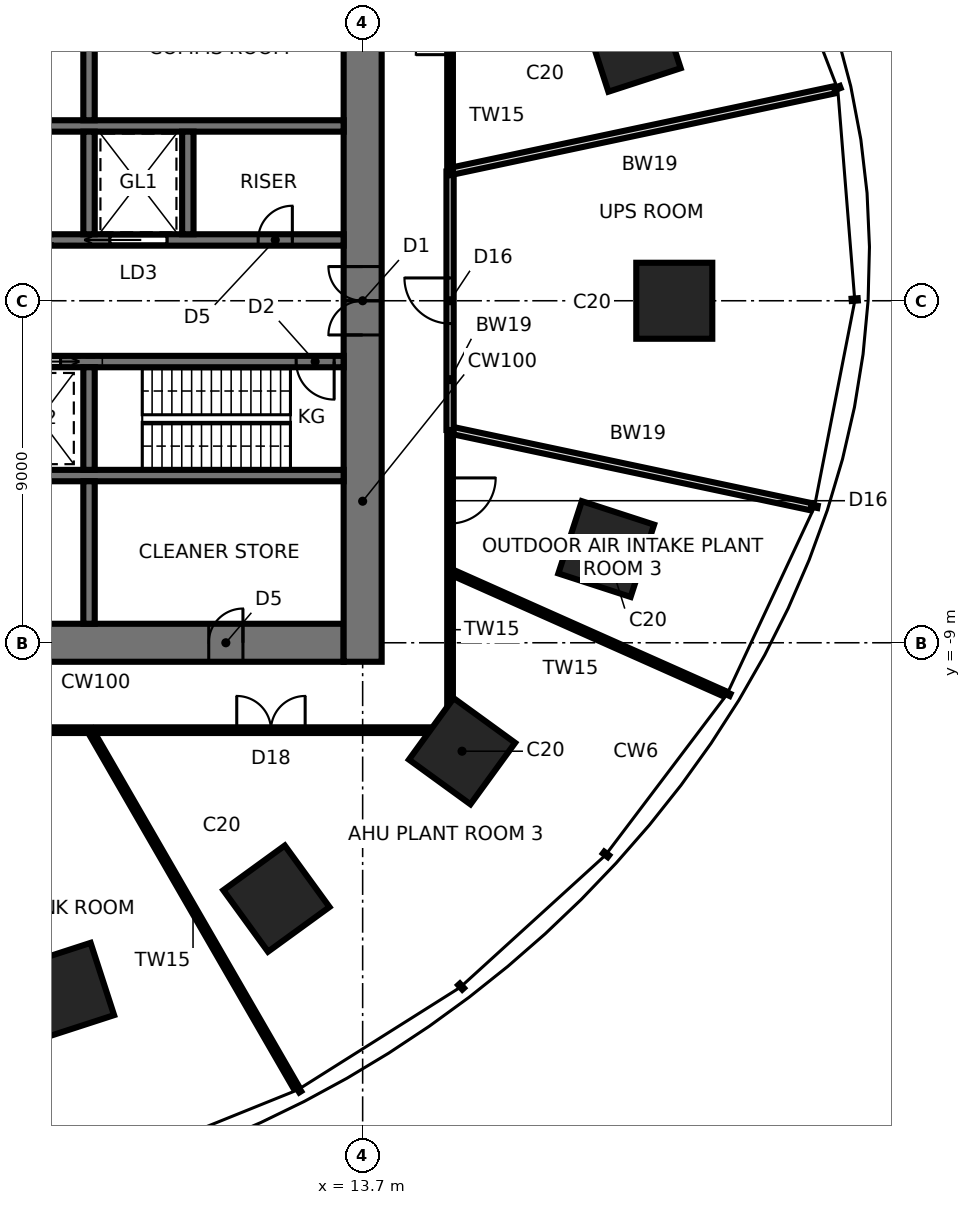
"""IFC4 building model, lengths in metres.
Left out: names, types, materials, properties, quantities, classifications, styles, units other than length and angle.
Written with IfcOpenShell. Run it as: python <this file> out.ifc"""

import sys

from ifc_helpers import new_model, si_unit, direction, frame, frame_2d, origin, origin_2d, place, context, subcontext, project, spatial, rectangle, extrude, element, fill, save


model = new_model("IFC4")
c1 = context("Model", 3, precision=1e-05, world=origin(), true_north=direction((0.0, 1.0)))
c2 = subcontext(c1, "Body", "Model", "MODEL_VIEW")
j1 = project(units=[si_unit("LENGTHUNIT", "METRE"), si_unit("PLANEANGLEUNIT", "RADIAN")], contexts=[c1])
p1 = place(None, origin())
s1 = spatial("IfcSite", under=j1, at=p1, CompositionType="ELEMENT")
p2 = place(p1, origin())
s2 = spatial("IfcBuilding", under=s1, at=p2, CompositionType="ELEMENT")
p3 = place(p2, frame((0.0, 0.0, 86.8)))
s3 = spatial("IfcBuildingStorey", under=s2, at=p3, CompositionType="ELEMENT", Elevation=86.8)
for number, where, z_axis, x_axis in (
    (1, (21.9, 0.0, 0.0), (0.0, 0.0, 1.0), (1.0, 0.0, 0.0)),
    (2, (20.808, 6.761, 0.0), (0.0, 0.0, 1.0), (0.951, 0.309, 0.0)),
    (3, (5.9, -18.157, 0.0), (0.0, 0.0, 1.0), (0.309, -0.951, 0.0)),
    (4, (11.43, -15.733, 0.0), (0.0, 0.0, 1.0), (0.588, -0.809, 0.0)),
    (5, (16.315, -11.854, 0.0), (0.0, 0.0, 1.0), (0.809, -0.588, 0.0)),
    (6, (20.109, -6.534, 0.0), (0.0, 0.0, 1.0), (0.951, -0.309, 0.0)),
):
    element("IfcColumn", number, at=place(p3, frame(where, z_axis=z_axis, x_axis=x_axis)), inside=s3, PredefinedType="COLUMN", context=c2, shape_type="SweptSolid", body=[
        extrude(rectangle(XDim=2.0, YDim=2.0, at=origin_2d()), origin(), (0.0, 0.0, 1.0), 5.6),
    ])
p4 = place(p3, frame((-13.2, -9.0, 0.0), z_axis=(0.0, 0.0, 1.0), x_axis=(1.0, 0.0, 0.0)))
e7 = element("IfcWall", 7, at=p4, inside=s3, PredefinedType="SHEAR", context=c2, shape_type="SweptSolid", body=[
    extrude(rectangle(XDim=26.4, YDim=1.0, at=frame_2d((13.2, 0.0))), origin(), (0.0, 0.0, 1.0), 5.6),
])
p5 = place(p4, frame((2.65, 0.0, 0.0)))
e8 = element("IfcOpeningElement", 8, at=p5, cuts=e7, PredefinedType="OPENING", context=c2, shape_type="SweptSolid", body=[
    extrude(rectangle(XDim=0.9, YDim=2.1, at=frame_2d((0.45, 1.05))), frame((0.0, 0.51, 0.0), z_axis=(0.0, -1.0, 0.0), x_axis=(1.0, 0.0, 0.0)), (0.0, 0.0, 1.0), 1.02),
])
p6 = place(p4, frame((9.5, 0.0, 0.0)))
e9 = element("IfcOpeningElement", 9, at=p6, cuts=e7, PredefinedType="OPENING", context=c2, shape_type="SweptSolid", body=[
    extrude(rectangle(XDim=0.9, YDim=2.1, at=frame_2d((0.45, 1.05))), frame((0.0, 0.51, 0.0), z_axis=(0.0, -1.0, 0.0), x_axis=(1.0, 0.0, 0.0)), (0.0, 0.0, 1.0), 1.02),
])
p7 = place(p4, frame((16.0, 0.0, 0.0)))
e10 = element("IfcOpeningElement", 10, at=p7, cuts=e7, PredefinedType="OPENING", context=c2, shape_type="SweptSolid", body=[
    extrude(rectangle(XDim=0.9, YDim=2.1, at=frame_2d((0.45, 1.05))), frame((0.0, 0.51, 0.0), z_axis=(0.0, -1.0, 0.0), x_axis=(1.0, 0.0, 0.0)), (0.0, 0.0, 1.0), 1.02),
])
p8 = place(p4, frame((22.85, 0.0, 0.0)))
e11 = element("IfcOpeningElement", 11, at=p8, cuts=e7, PredefinedType="OPENING", context=c2, shape_type="SweptSolid", body=[
    extrude(rectangle(XDim=0.9, YDim=2.1, at=frame_2d((0.45, 1.05))), frame((0.0, 0.51, 0.0), z_axis=(0.0, -1.0, 0.0), x_axis=(1.0, 0.0, 0.0)), (0.0, 0.0, 1.0), 1.02),
])
p9 = place(p3, frame((13.7, -9.5, 0.0), z_axis=(0.0, 0.0, 1.0), x_axis=(0.0, 1.0, 0.0)))
e12 = element("IfcWall", 12, at=p9, inside=s3, PredefinedType="SHEAR", context=c2, shape_type="SweptSolid", body=[
    extrude(rectangle(XDim=19.0, YDim=1.0, at=frame_2d((9.5, 0.0))), origin(), (0.0, 0.0, 1.0), 5.6),
])
p10 = place(p9, frame((8.6, 0.0, 0.0)))
e13 = element("IfcOpeningElement", 13, at=p10, cuts=e12, PredefinedType="OPENING", context=c2, shape_type="SweptSolid", body=[
    extrude(rectangle(XDim=1.8, YDim=2.4, at=frame_2d((0.9, 1.2))), frame((0.0, 0.51, 0.0), z_axis=(0.0, -1.0, 0.0), x_axis=(1.0, 0.0, 0.0)), (0.0, 0.0, 1.0), 1.02),
])
p11 = place(p3, frame((-13.2, 1.6, 0.0), z_axis=(0.0, 0.0, 1.0), x_axis=(1.0, 0.0, 0.0)))
e14 = element("IfcWall", 14, at=p11, inside=s3, PredefinedType="SHEAR", context=c2, shape_type="SweptSolid", body=[
    extrude(rectangle(XDim=26.4, YDim=0.3, at=frame_2d((13.2, 0.0))), origin(), (0.0, 0.0, 1.0), 5.6),
])
p12 = place(p11, frame((0.25, 0.0, 0.0)))
e15 = element("IfcOpeningElement", 15, at=p12, cuts=e14, PredefinedType="OPENING", context=c2, shape_type="SweptSolid", body=[
    extrude(rectangle(XDim=1.0, YDim=2.1, at=frame_2d((0.5, 1.05))), frame((0.0, 0.16, 0.0), z_axis=(0.0, -1.0, 0.0), x_axis=(1.0, 0.0, 0.0)), (0.0, 0.0, 1.0), 0.32),
])
p13 = place(p11, frame((20.25, 0.0, 0.0)))
e16 = element("IfcOpeningElement", 16, at=p13, cuts=e14, PredefinedType="OPENING", context=c2, shape_type="SweptSolid", body=[
    extrude(rectangle(XDim=1.5, YDim=2.4, at=frame_2d((0.75, 1.2))), frame((0.0, 0.16, 0.0), z_axis=(0.0, -1.0, 0.0), x_axis=(1.0, 0.0, 0.0)), (0.0, 0.0, 1.0), 0.32),
])
p14 = place(p11, frame((7.55, 0.0, 0.0)))
e17 = element("IfcOpeningElement", 17, at=p14, cuts=e14, PredefinedType="OPENING", context=c2, shape_type="SweptSolid", body=[
    extrude(rectangle(XDim=0.9, YDim=2.1, at=frame_2d((0.45, 1.05))), frame((0.0, 0.16, 0.0), z_axis=(0.0, -1.0, 0.0), x_axis=(1.0, 0.0, 0.0)), (0.0, 0.0, 1.0), 0.32),
])
p15 = place(p11, frame((10.15, 0.0, 0.0)))
e18 = element("IfcOpeningElement", 18, at=p15, cuts=e14, PredefinedType="OPENING", context=c2, shape_type="SweptSolid", body=[
    extrude(rectangle(XDim=0.9, YDim=2.1, at=frame_2d((0.45, 1.05))), frame((0.0, 0.16, 0.0), z_axis=(0.0, -1.0, 0.0), x_axis=(1.0, 0.0, 0.0)), (0.0, 0.0, 1.0), 0.32),
])
p16 = place(p11, frame((12.75, 0.0, 0.0)))
e19 = element("IfcOpeningElement", 19, at=p16, cuts=e14, PredefinedType="OPENING", context=c2, shape_type="SweptSolid", body=[
    extrude(rectangle(XDim=0.9, YDim=2.1, at=frame_2d((0.45, 1.05))), frame((0.0, 0.16, 0.0), z_axis=(0.0, -1.0, 0.0), x_axis=(1.0, 0.0, 0.0)), (0.0, 0.0, 1.0), 0.32),
])
p17 = place(p11, frame((24.15, 0.0, 0.0)))
e20 = element("IfcOpeningElement", 20, at=p17, cuts=e14, PredefinedType="OPENING", context=c2, shape_type="SweptSolid", body=[
    extrude(rectangle(XDim=0.9, YDim=2.1, at=frame_2d((0.45, 1.05))), frame((0.0, 0.16, 0.0), z_axis=(0.0, -1.0, 0.0), x_axis=(1.0, 0.0, 0.0)), (0.0, 0.0, 1.0), 0.32),
])
p18 = place(p3, frame((-13.2, -1.6, 0.0), z_axis=(0.0, 0.0, 1.0), x_axis=(1.0, 0.0, 0.0)))
e21 = element("IfcWall", 21, at=p18, inside=s3, PredefinedType="SHEAR", context=c2, shape_type="SweptSolid", body=[
    extrude(rectangle(XDim=26.4, YDim=0.3, at=frame_2d((13.2, 0.0))), origin(), (0.0, 0.0, 1.0), 5.6),
])
p19 = place(p18, frame((25.15, 0.0, 0.0)))
e22 = element("IfcOpeningElement", 22, at=p19, cuts=e21, PredefinedType="OPENING", context=c2, shape_type="SweptSolid", body=[
    extrude(rectangle(XDim=1.0, YDim=2.1, at=frame_2d((0.5, 1.05))), frame((0.0, 0.16, 0.0), z_axis=(0.0, -1.0, 0.0), x_axis=(1.0, 0.0, 0.0)), (0.0, 0.0, 1.0), 0.32),
])
p20 = place(p18, frame((15.25, 0.0, 0.0)))
e23 = element("IfcOpeningElement", 23, at=p20, cuts=e21, PredefinedType="OPENING", context=c2, shape_type="SweptSolid", body=[
    extrude(rectangle(XDim=1.1, YDim=2.3, at=frame_2d((0.55, 1.15))), frame((0.0, 0.16, 0.0), z_axis=(0.0, -1.0, 0.0), x_axis=(1.0, 0.0, 0.0)), (0.0, 0.0, 1.0), 0.32),
])
p21 = place(p18, frame((17.85, 0.0, 0.0)))
e24 = element("IfcOpeningElement", 24, at=p21, cuts=e21, PredefinedType="OPENING", context=c2, shape_type="SweptSolid", body=[
    extrude(rectangle(XDim=1.1, YDim=2.3, at=frame_2d((0.55, 1.15))), frame((0.0, 0.16, 0.0), z_axis=(0.0, -1.0, 0.0), x_axis=(1.0, 0.0, 0.0)), (0.0, 0.0, 1.0), 0.32),
])
p22 = place(p18, frame((5.55, 0.0, 0.0)))
e25 = element("IfcOpeningElement", 25, at=p22, cuts=e21, PredefinedType="OPENING", context=c2, shape_type="SweptSolid", body=[
    extrude(rectangle(XDim=0.9, YDim=2.1, at=frame_2d((0.45, 1.05))), frame((0.0, 0.16, 0.0), z_axis=(0.0, -1.0, 0.0), x_axis=(1.0, 0.0, 0.0)), (0.0, 0.0, 1.0), 0.32),
])
for number, where, z_axis, x_axis in (
    (26, (-13.2, 4.6, 0.0), (0.0, 0.0, 1.0), (1.0, 0.0, 0.0)),
    (27, (-13.2, -4.6, 0.0), (0.0, 0.0, 1.0), (1.0, 0.0, 0.0)),
):
    element("IfcWall", number, at=place(p3, frame(where, z_axis=z_axis, x_axis=x_axis)), inside=s3, PredefinedType="SHEAR", context=c2, shape_type="SweptSolid", body=[
        extrude(rectangle(XDim=26.4, YDim=0.3, at=frame_2d((13.2, 0.0))), origin(), (0.0, 0.0, 1.0), 5.6),
    ])
p23 = place(p3, frame((6.5, 1.75, 0.0), z_axis=(0.0, 0.0, 1.0), x_axis=(0.0, 1.0, 0.0)))
e28 = element("IfcWall", 28, at=p23, inside=s3, PredefinedType="SHEAR", context=c2, shape_type="SweptSolid", body=[
    extrude(rectangle(XDim=2.7, YDim=0.3, at=frame_2d((1.35, 0.0))), origin(), (0.0, 0.0, 1.0), 5.6),
])
p24 = place(p3, frame((6.5, 4.75, 0.0), z_axis=(0.0, 0.0, 1.0), x_axis=(0.0, 1.0, 0.0)))
e29 = element("IfcWall", 29, at=p24, inside=s3, PredefinedType="SHEAR", context=c2, shape_type="SweptSolid", body=[
    extrude(rectangle(XDim=3.75, YDim=0.3, at=frame_2d((1.875, 0.0))), origin(), (0.0, 0.0, 1.0), 5.6),
])
p25 = place(p3, frame((6.5, -1.75, 0.0), z_axis=(0.0, 0.0, 1.0), x_axis=(0.0, -1.0, 0.0)))
e30 = element("IfcWall", 30, at=p25, inside=s3, PredefinedType="SHEAR", context=c2, shape_type="SweptSolid", body=[
    extrude(rectangle(XDim=2.7, YDim=0.3, at=frame_2d((1.35, 0.0))), origin(), (0.0, 0.0, 1.0), 5.6),
])
p26 = place(p3, frame((6.5, -4.75, 0.0), z_axis=(0.0, 0.0, 1.0), x_axis=(0.0, -1.0, 0.0)))
e31 = element("IfcWall", 31, at=p26, inside=s3, PredefinedType="SHEAR", context=c2, shape_type="SweptSolid", body=[
    extrude(rectangle(XDim=3.75, YDim=0.3, at=frame_2d((1.875, 0.0))), origin(), (0.0, 0.0, 1.0), 5.6),
])
p27 = place(p3, frame((9.1, 1.75, 0.0), z_axis=(0.0, 0.0, 1.0), x_axis=(0.0, 1.0, 0.0)))
e32 = element("IfcWall", 32, at=p27, inside=s3, PredefinedType="SHEAR", context=c2, shape_type="SweptSolid", body=[
    extrude(rectangle(XDim=2.7, YDim=0.3, at=frame_2d((1.35, 0.0))), origin(), (0.0, 0.0, 1.0), 5.6),
])
p28 = place(p3, frame((-16.0, -11.3, 0.0), z_axis=(0.0, 0.0, 1.0), x_axis=(1.0, 0.0, 0.0)))
e33 = element("IfcWall", 33, at=p28, inside=s3, PredefinedType="PARTITIONING", context=c2, shape_type="SweptSolid", body=[
    extrude(rectangle(XDim=32.0, YDim=0.15, at=frame_2d((16.0, 0.0))), origin(), (0.0, 0.0, 1.0), 5.4),
])
p29 = place(p28, frame((7.026, 0.0, 0.0)))
e34 = element("IfcOpeningElement", 34, at=p29, cuts=e33, PredefinedType="OPENING", context=c2, shape_type="SweptSolid", body=[
    extrude(rectangle(XDim=1.2, YDim=2.1, at=frame_2d((0.6, 1.05))), frame((0.0, 0.085, 0.0), z_axis=(0.0, -1.0, 0.0), x_axis=(1.0, 0.0, 0.0)), (0.0, 0.0, 1.0), 0.17),
])
p30 = place(p28, frame((11.544, 0.0, 0.0)))
e35 = element("IfcOpeningElement", 35, at=p30, cuts=e33, PredefinedType="OPENING", context=c2, shape_type="SweptSolid", body=[
    extrude(rectangle(XDim=1.2, YDim=2.1, at=frame_2d((0.6, 1.05))), frame((0.0, 0.085, 0.0), z_axis=(0.0, -1.0, 0.0), x_axis=(1.0, 0.0, 0.0)), (0.0, 0.0, 1.0), 0.17),
])
p31 = place(p28, frame((17.768, 0.0, 0.0)))
e36 = element("IfcOpeningElement", 36, at=p31, cuts=e33, PredefinedType="OPENING", context=c2, shape_type="SweptSolid", body=[
    extrude(rectangle(XDim=1.8, YDim=2.4, at=frame_2d((0.9, 1.2))), frame((0.0, 0.085, 0.0), z_axis=(0.0, -1.0, 0.0), x_axis=(1.0, 0.0, 0.0)), (0.0, 0.0, 1.0), 0.17),
])
p32 = place(p28, frame((26.387, 0.0, 0.0)))
e37 = element("IfcOpeningElement", 37, at=p32, cuts=e33, PredefinedType="OPENING", context=c2, shape_type="SweptSolid", body=[
    extrude(rectangle(XDim=1.8, YDim=2.4, at=frame_2d((0.9, 1.2))), frame((0.0, 0.085, 0.0), z_axis=(0.0, -1.0, 0.0), x_axis=(1.0, 0.0, 0.0)), (0.0, 0.0, 1.0), 0.17),
])
p33 = place(p3, frame((6.524, -11.3, 0.0), z_axis=(0.0, 0.0, 1.0), x_axis=(0.499989292232, -0.866031585829, 0.0)))
e38 = element("IfcWall", 38, at=p33, inside=s3, PredefinedType="PARTITIONING", context=c2, shape_type="SweptSolid", body=[
    extrude(rectangle(XDim=10.85, YDim=0.15, at=frame_2d((5.425, 0.0))), origin(), (0.0, 0.0, 1.0), 5.4),
])
p34 = place(p3, frame((16.0, -11.3, 0.0), z_axis=(0.0, 0.0, 1.0), x_axis=(0.0, 1.0, 0.0)))
e39 = element("IfcWall", 39, at=p34, inside=s3, PredefinedType="PARTITIONING", context=c2, shape_type="SweptSolid", body=[
    extrude(rectangle(XDim=7.899, YDim=0.15, at=frame_2d((3.95, 0.0))), origin(), (0.0, 0.0, 1.0), 5.4),
])
p35 = place(p34, frame((5.438, 0.0, 0.0)))
e40 = element("IfcOpeningElement", 40, at=p35, cuts=e39, PredefinedType="OPENING", context=c2, shape_type="SweptSolid", body=[
    extrude(rectangle(XDim=1.2, YDim=2.1, at=frame_2d((0.6, 1.05))), frame((0.0, 0.085, 0.0), z_axis=(0.0, -1.0, 0.0), x_axis=(1.0, 0.0, 0.0)), (0.0, 0.0, 1.0), 0.17),
])
p36 = place(p3, frame((16.0, -7.124, 0.0), z_axis=(0.0, 0.0, 1.0), x_axis=(0.91354979121, -0.406726909584, 0.0)))
e41 = element("IfcWall", 41, at=p36, inside=s3, PredefinedType="PARTITIONING", context=c2, shape_type="SweptSolid", body=[
    extrude(rectangle(XDim=7.89, YDim=0.15, at=frame_2d((3.945, 0.0))), origin(), (0.0, 0.0, 1.0), 5.4),
])
p37 = place(p3, frame((16.0, -3.401, 0.0), z_axis=(0.0, 0.0, 1.0), x_axis=(0.978145186273, -0.207923049637, 0.0)))
e42 = element("IfcWall", 42, at=p37, inside=s3, PredefinedType="SOLIDWALL", context=c2, shape_type="SweptSolid", body=[
    extrude(rectangle(XDim=9.719, YDim=0.19, at=frame_2d((4.859, 0.0))), origin(), (0.0, 0.0, 1.0), 5.4),
])
p38 = place(p3, frame((16.0, -3.401, 0.0), z_axis=(0.0, 0.0, 1.0), x_axis=(0.0, 1.0, 0.0)))
e43 = element("IfcWall", 43, at=p38, inside=s3, PredefinedType="SOLIDWALL", context=c2, shape_type="SweptSolid", body=[
    extrude(rectangle(XDim=6.802, YDim=0.19, at=frame_2d((3.401, 0.0))), origin(), (0.0, 0.0, 1.0), 5.4),
])
p39 = place(p38, frame((2.801, 0.0, 0.0)))
e44 = element("IfcOpeningElement", 44, at=p39, cuts=e43, PredefinedType="OPENING", context=c2, shape_type="SweptSolid", body=[
    extrude(rectangle(XDim=1.2, YDim=2.1, at=frame_2d((0.6, 1.05))), frame((0.0, 0.105, 0.0), z_axis=(0.0, -1.0, 0.0), x_axis=(1.0, 0.0, 0.0)), (0.0, 0.0, 1.0), 0.21),
])
p40 = place(p3, frame((26.123, 5.553, 0.0), z_axis=(0.0, 0.0, 1.0), x_axis=(-0.978145959178, -0.207919413582, 0.0)))
e45 = element("IfcWall", 45, at=p40, inside=s3, PredefinedType="SOLIDWALL", context=c2, shape_type="SweptSolid", body=[
    extrude(rectangle(XDim=10.349, YDim=0.19, at=frame_2d((5.175, 0.0))), origin(), (0.0, 0.0, 1.0), 5.4),
])
p41 = place(p3, frame((16.0, 3.401, 0.0), z_axis=(0.0, 0.0, 1.0), x_axis=(0.0, 1.0, 0.0)))
e46 = element("IfcWall", 46, at=p41, inside=s3, PredefinedType="PARTITIONING", context=c2, shape_type="SweptSolid", body=[
    extrude(rectangle(XDim=7.899, YDim=0.15, at=frame_2d((3.95, 0.0))), origin(), (0.0, 0.0, 1.0), 5.4),
])
p42 = place(p41, frame((3.075, 0.0, 0.0)))
e47 = element("IfcOpeningElement", 47, at=p42, cuts=e46, PredefinedType="OPENING", context=c2, shape_type="SweptSolid", body=[
    extrude(rectangle(XDim=1.8, YDim=2.4, at=frame_2d((0.9, 1.2))), frame((0.0, 0.085, 0.0), z_axis=(0.0, -1.0, 0.0), x_axis=(1.0, 0.0, 0.0)), (0.0, 0.0, 1.0), 0.17),
])
p43 = place(p10, origin())
e48 = element("IfcDoor", 48, at=p43, inside=s3, OperationType="DOUBLE_DOOR_SINGLE_SWING", PredefinedType="DOOR", context=c2, shape_type="SweptSolid", body=[
    extrude(rectangle(XDim=1.72, YDim=2.36, at=frame_2d((0.9, 1.18))), frame((0.0, 0.025, 0.0), z_axis=(0.0, -1.0, 0.0), x_axis=(1.0, 0.0, 0.0)), (0.0, 0.0, 1.0), 0.05),
    extrude(rectangle(XDim=0.04, YDim=2.4, at=frame_2d((0.02, 1.2))), frame((0.0, 0.25, 0.0), z_axis=(0.0, -1.0, 0.0), x_axis=(1.0, 0.0, 0.0)), (0.0, 0.0, 1.0), 0.5),
    extrude(rectangle(XDim=0.04, YDim=2.4, at=frame_2d((1.78, 1.2))), frame((0.0, 0.25, 0.0), z_axis=(0.0, -1.0, 0.0), x_axis=(1.0, 0.0, 0.0)), (0.0, 0.0, 1.0), 0.5),
    extrude(rectangle(XDim=1.72, YDim=0.04, at=frame_2d((0.9, 2.38))), frame((0.0, 0.25, 0.0), z_axis=(0.0, -1.0, 0.0), x_axis=(1.0, 0.0, 0.0)), (0.0, 0.0, 1.0), 0.5),
])
fill(e13, e48)
p44 = place(p19, frame((1.0, 0.0, 0.0), z_axis=(0.0, 0.0, 1.0), x_axis=(-1.0, 0.0, 0.0)))
e49 = element("IfcDoor", 49, at=p44, inside=s3, OperationType="SINGLE_SWING_LEFT", PredefinedType="DOOR", context=c2, shape_type="SweptSolid", body=[
    extrude(rectangle(XDim=1.0, YDim=2.1, at=frame_2d((0.5, 1.05))), frame((0.0, 0.025, 0.0), z_axis=(0.0, -1.0, 0.0), x_axis=(1.0, 0.0, 0.0)), (0.0, 0.0, 1.0), 0.05),
])
fill(e22, e49)
p45 = place(p13, origin())
e50 = element("IfcDoor", 50, at=p45, inside=s3, OperationType="SLIDING_TO_LEFT", PredefinedType="DOOR", context=c2, shape_type="SweptSolid", body=[
    extrude(rectangle(XDim=1.5, YDim=2.4, at=frame_2d((0.75, 1.2))), frame((0.0, 0.025, 0.0), z_axis=(0.0, -1.0, 0.0), x_axis=(1.0, 0.0, 0.0)), (0.0, 0.0, 1.0), 0.05),
])
fill(e16, e50)
p46 = place(p21, frame((1.1, 0.0, 0.0), z_axis=(0.0, 0.0, 1.0), x_axis=(-1.0, 0.0, 0.0)))
e51 = element("IfcDoor", 51, at=p46, inside=s3, OperationType="SLIDING_TO_LEFT", PredefinedType="DOOR", context=c2, shape_type="SweptSolid", body=[
    extrude(rectangle(XDim=1.1, YDim=2.3, at=frame_2d((0.55, 1.15))), frame((0.0, 0.025, 0.0), z_axis=(0.0, -1.0, 0.0), x_axis=(1.0, 0.0, 0.0)), (0.0, 0.0, 1.0), 0.05),
])
fill(e24, e51)
p47 = place(p17, origin())
e52 = element("IfcDoor", 52, at=p47, inside=s3, OperationType="SINGLE_SWING_RIGHT", PredefinedType="DOOR", context=c2, shape_type="SweptSolid", body=[
    extrude(rectangle(XDim=0.9, YDim=2.1, at=frame_2d((0.45, 1.05))), frame((0.0, 0.025, 0.0), z_axis=(0.0, -1.0, 0.0), x_axis=(1.0, 0.0, 0.0)), (0.0, 0.0, 1.0), 0.05),
])
fill(e20, e52)
p48 = place(p8, origin())
e53 = element("IfcDoor", 53, at=p48, inside=s3, OperationType="SINGLE_SWING_RIGHT", PredefinedType="DOOR", context=c2, shape_type="SweptSolid", body=[
    extrude(rectangle(XDim=0.82, YDim=2.06, at=frame_2d((0.45, 1.03))), frame((0.0, 0.025, 0.0), z_axis=(0.0, -1.0, 0.0), x_axis=(1.0, 0.0, 0.0)), (0.0, 0.0, 1.0), 0.05),
    extrude(rectangle(XDim=0.04, YDim=2.1, at=frame_2d((0.02, 1.05))), frame((0.0, 0.25, 0.0), z_axis=(0.0, -1.0, 0.0), x_axis=(1.0, 0.0, 0.0)), (0.0, 0.0, 1.0), 0.5),
    extrude(rectangle(XDim=0.04, YDim=2.1, at=frame_2d((0.88, 1.05))), frame((0.0, 0.25, 0.0), z_axis=(0.0, -1.0, 0.0), x_axis=(1.0, 0.0, 0.0)), (0.0, 0.0, 1.0), 0.5),
    extrude(rectangle(XDim=0.82, YDim=0.04, at=frame_2d((0.45, 2.08))), frame((0.0, 0.25, 0.0), z_axis=(0.0, -1.0, 0.0), x_axis=(1.0, 0.0, 0.0)), (0.0, 0.0, 1.0), 0.5),
])
fill(e11, e53)
p49 = place(p42, origin())
e54 = element("IfcDoor", 54, at=p49, inside=s3, OperationType="DOUBLE_DOOR_SINGLE_SWING", PredefinedType="DOOR", context=c2, shape_type="SweptSolid", body=[
    extrude(rectangle(XDim=1.8, YDim=2.4, at=frame_2d((0.9, 1.2))), frame((0.0, 0.025, 0.0), z_axis=(0.0, -1.0, 0.0), x_axis=(1.0, 0.0, 0.0)), (0.0, 0.0, 1.0), 0.05),
])
fill(e47, e54)
p50 = place(p32, origin())
e55 = element("IfcDoor", 55, at=p50, inside=s3, OperationType="DOUBLE_DOOR_SINGLE_SWING", PredefinedType="DOOR", context=c2, shape_type="SweptSolid", body=[
    extrude(rectangle(XDim=1.8, YDim=2.4, at=frame_2d((0.9, 1.2))), frame((0.0, 0.025, 0.0), z_axis=(0.0, -1.0, 0.0), x_axis=(1.0, 0.0, 0.0)), (0.0, 0.0, 1.0), 0.05),
])
fill(e37, e55)
p51 = place(p35, frame((1.2, 0.0, 0.0), z_axis=(0.0, 0.0, 1.0), x_axis=(-1.0, 0.0, 0.0)))
e56 = element("IfcDoor", 56, at=p51, inside=s3, OperationType="SINGLE_SWING_LEFT", PredefinedType="DOOR", context=c2, shape_type="SweptSolid", body=[
    extrude(rectangle(XDim=1.2, YDim=2.1, at=frame_2d((0.6, 1.05))), frame((0.0, 0.025, 0.0), z_axis=(0.0, -1.0, 0.0), x_axis=(1.0, 0.0, 0.0)), (0.0, 0.0, 1.0), 0.05),
])
fill(e40, e56)
p52 = place(p39, origin())
e57 = element("IfcDoor", 57, at=p52, inside=s3, OperationType="SINGLE_SWING_RIGHT", PredefinedType="DOOR", context=c2, shape_type="SweptSolid", body=[
    extrude(rectangle(XDim=1.2, YDim=2.1, at=frame_2d((0.6, 1.05))), frame((0.0, 0.025, 0.0), z_axis=(0.0, -1.0, 0.0), x_axis=(1.0, 0.0, 0.0)), (0.0, 0.0, 1.0), 0.05),
])
fill(e44, e57)
save(model, sys.argv[1])
